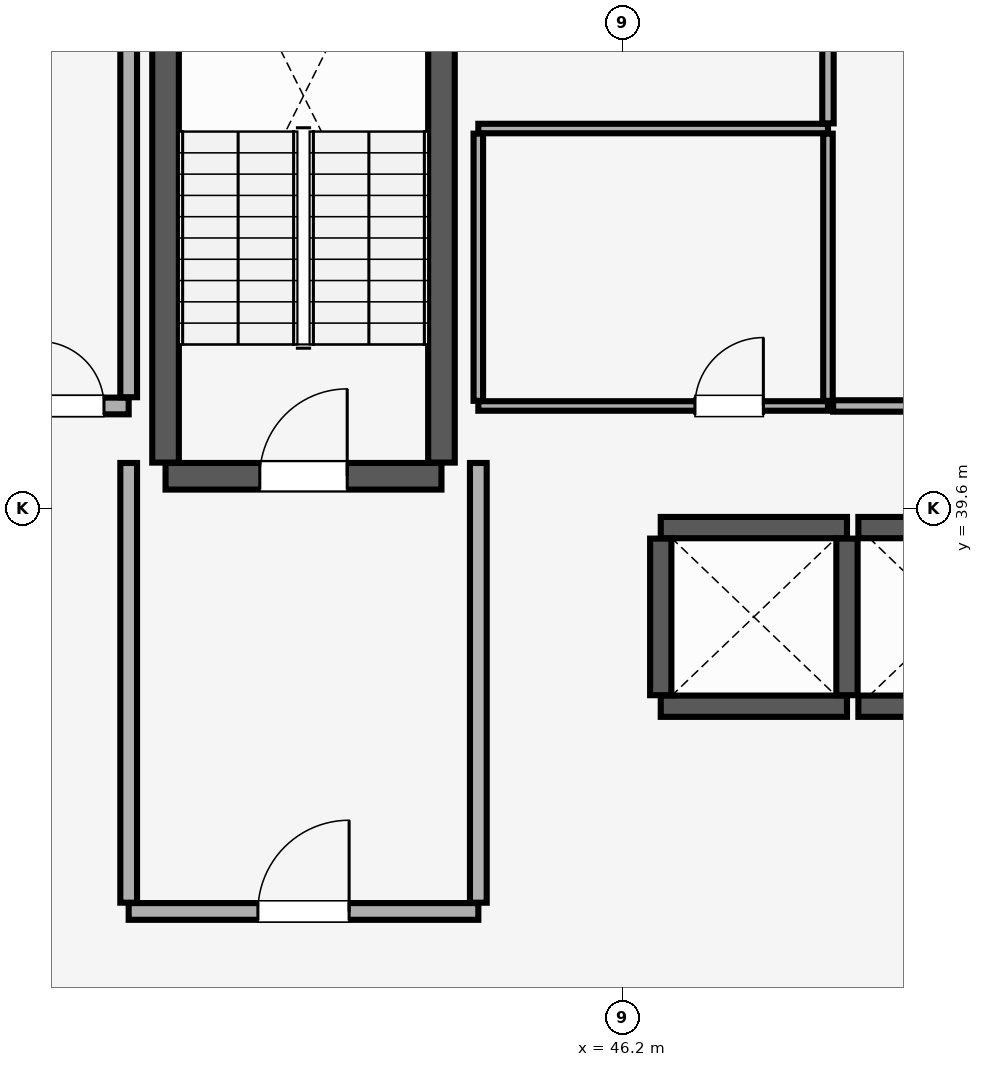
"""IFC4 building model, lengths in metres.
Left out: names, types, materials, properties, quantities, classifications, styles, units other than length and angle.
Written with IfcOpenShell. Run it as: python <this file> out.ifc"""

import sys

from ifc_helpers import new_model, si_unit, direction, frame, frame_2d, origin, place, context, subcontext, project, spatial, rectangle, extrude, element, fill, save


model = new_model("IFC4")
c1 = context("Model", 3, precision=1e-05, world=origin(), true_north=direction((0.0, 1.0)))
c2 = subcontext(c1, "Body", "Model", "MODEL_VIEW")
j1 = project(units=[si_unit("LENGTHUNIT", "METRE"), si_unit("PLANEANGLEUNIT", "RADIAN")], contexts=[c1])
p1 = place(None, origin())
s1 = spatial("IfcSite", under=j1, at=p1, CompositionType="ELEMENT")
p2 = place(p1, origin())
s2 = spatial("IfcBuilding", under=s1, at=p2, CompositionType="ELEMENT")
p3 = place(p2, frame((0.0, 0.0, 46.4)))
s3 = spatial("IfcBuildingStorey", under=s2, at=p3, CompositionType="ELEMENT", Elevation=46.4)
p4 = place(p3, frame((40.185, 40.025, 0.0), z_axis=(0.0, 0.0, 1.0), x_axis=(1.0, 0.0, 0.0)))
e1 = element("IfcWall", 1, at=p4, inside=s3, PredefinedType="SHEAR", context=c2, shape_type="SweptSolid", body=[
    extrude(rectangle(XDim=3.63, YDim=0.35, at=frame_2d((1.815, 0.0))), origin(), (0.0, 0.0, 1.0), 3.51),
])
p5 = place(p4, frame((1.24, 0.0, 0.0)))
e2 = element("IfcOpeningElement", 2, at=p5, cuts=e1, PredefinedType="OPENING", context=c2, shape_type="SweptSolid", body=[
    extrude(rectangle(XDim=1.15, YDim=2.15, at=frame_2d((0.575, 1.075))), frame((0.0, 0.185, 0.0), z_axis=(0.0, -1.0, 0.0), x_axis=(1.0, 0.0, 0.0)), (0.0, 0.0, 1.0), 0.37),
])
for number, where, z_axis, x_axis in (
    (3, (40.185, 40.205, 0.0), (0.0, 0.0, 1.0), (0.0, 1.0, 0.0)),
    (4, (43.815, 40.205, 0.0), (0.0, 0.0, 1.0), (0.0, 1.0, 0.0)),
):
    element("IfcWall", number, at=place(p3, frame(where, z_axis=z_axis, x_axis=x_axis)), inside=s3, PredefinedType="SHEAR", context=c2, shape_type="SweptSolid", body=[
        extrude(rectangle(XDim=8.09, YDim=0.35, at=frame_2d((4.045, 0.0))), origin(), (0.0, 0.0, 1.0), 3.51),
    ])
for number, where, z_axis, x_axis in (
    (5, (46.7, 37.0, 0.0), (0.0, 0.0, 1.0), (1.0, 0.0, 0.0)),
    (6, (46.7, 39.35, 0.0), (0.0, 0.0, 1.0), (1.0, 0.0, 0.0)),
):
    element("IfcWall", number, at=place(p3, frame(where, z_axis=z_axis, x_axis=x_axis)), inside=s3, PredefinedType="SHEAR", context=c2, shape_type="SweptSolid", body=[
        extrude(rectangle(XDim=2.45, YDim=0.28, at=frame_2d((1.225, 0.0))), origin(), (0.0, 0.0, 1.0), 3.51),
    ])
for number, where, z_axis, x_axis in (
    (7, (46.7, 37.145, 0.0), (0.0, 0.0, 1.0), (0.0, 1.0, 0.0)),
    (8, (49.15, 37.145, 0.0), (0.0, 0.0, 1.0), (0.0, 1.0, 0.0)),
):
    element("IfcWall", number, at=place(p3, frame(where, z_axis=z_axis, x_axis=x_axis)), inside=s3, PredefinedType="SHEAR", context=c2, shape_type="SweptSolid", body=[
        extrude(rectangle(XDim=2.06, YDim=0.28, at=frame_2d((1.03, 0.0))), origin(), (0.0, 0.0, 1.0), 3.51),
    ])
for number, where, z_axis, x_axis in (
    (9, (49.3, 37.0, 0.0), (0.0, 0.0, 1.0), (1.0, 0.0, 0.0)),
    (10, (49.3, 39.35, 0.0), (0.0, 0.0, 1.0), (1.0, 0.0, 0.0)),
):
    element("IfcWall", number, at=place(p3, frame(where, z_axis=z_axis, x_axis=x_axis)), inside=s3, PredefinedType="SHEAR", context=c2, shape_type="SweptSolid", body=[
        extrude(rectangle(XDim=2.45, YDim=0.28, at=frame_2d((1.225, 0.0))), origin(), (0.0, 0.0, 1.0), 3.51),
    ])
p6 = place(p3, frame((39.7, 34.3, 0.0), z_axis=(0.0, 0.0, 1.0), x_axis=(1.0, 0.0, 0.0)))
e11 = element("IfcWall", 11, at=p6, inside=s3, PredefinedType="PARTITIONING", context=c2, shape_type="SweptSolid", body=[
    extrude(rectangle(XDim=4.6, YDim=0.22, at=frame_2d((2.3, 0.0))), origin(), (0.0, 0.0, 1.0), 3.51),
])
p7 = place(p6, frame((1.7, 0.0, 0.0)))
e12 = element("IfcOpeningElement", 12, at=p7, cuts=e11, PredefinedType="OPENING", context=c2, shape_type="SweptSolid", body=[
    extrude(rectangle(XDim=1.2, YDim=2.15, at=frame_2d((0.6, 1.075))), frame((0.0, 0.12, 0.0), z_axis=(0.0, -1.0, 0.0), x_axis=(1.0, 0.0, 0.0)), (0.0, 0.0, 1.0), 0.24),
])
for number, where, z_axis, x_axis in (
    (13, (39.7, 34.415, 0.0), (0.0, 0.0, 1.0), (0.0, 1.0, 0.0)),
    (14, (44.3, 34.415, 0.0), (0.0, 0.0, 1.0), (0.0, 1.0, 0.0)),
):
    element("IfcWall", number, at=place(p3, frame(where, z_axis=z_axis, x_axis=x_axis)), inside=s3, PredefinedType="PARTITIONING", context=c2, shape_type="SweptSolid", body=[
        extrude(rectangle(XDim=5.785, YDim=0.22, at=frame_2d((2.893, 0.0))), origin(), (0.0, 0.0, 1.0), 3.51),
    ])
p8 = place(p3, frame((36.28, 40.95, 0.0), z_axis=(0.0, 0.0, 1.0), x_axis=(1.0, 0.0, 0.0)))
e15 = element("IfcWall", 15, at=p8, inside=s3, PredefinedType="PARTITIONING", context=c2, shape_type="SweptSolid", body=[
    extrude(rectangle(XDim=3.42, YDim=0.22, at=frame_2d((1.71, 0.0))), origin(), (0.0, 0.0, 1.0), 3.51),
])
p9 = place(p8, frame((2.245, 0.0, 0.0)))
e16 = element("IfcOpeningElement", 16, at=p9, cuts=e15, PredefinedType="OPENING", context=c2, shape_type="SweptSolid", body=[
    extrude(rectangle(XDim=0.85, YDim=2.1, at=frame_2d((0.425, 1.05))), frame((0.0, 0.12, 0.0), z_axis=(0.0, -1.0, 0.0), x_axis=(1.0, 0.0, 0.0)), (0.0, 0.0, 1.0), 0.24),
])
p10 = place(p3, frame((39.7, 41.065, 0.0), z_axis=(0.0, 0.0, 1.0), x_axis=(0.0, 1.0, 0.0)))
e17 = element("IfcWall", 17, at=p10, inside=s3, PredefinedType="PARTITIONING", context=c2, shape_type="SweptSolid", body=[
    extrude(rectangle(XDim=7.785, YDim=0.22, at=frame_2d((3.893, 0.0))), origin(), (0.0, 0.0, 1.0), 3.51),
])
p11 = place(p3, frame((44.3, 40.95, 0.0), z_axis=(0.0, 0.0, 1.0), x_axis=(1.0, 0.0, 0.0)))
e18 = element("IfcWall", 18, at=p11, inside=s3, PredefinedType="PARTITIONING", context=c2, shape_type="SweptSolid", body=[
    extrude(rectangle(XDim=4.6, YDim=0.125, at=frame_2d((2.3, 0.0))), origin(), (0.0, 0.0, 1.0), 3.51),
])
p12 = place(p11, frame((2.85, 0.0, 0.0)))
e19 = element("IfcOpeningElement", 19, at=p12, cuts=e18, PredefinedType="OPENING", context=c2, shape_type="SweptSolid", body=[
    extrude(rectangle(XDim=0.9, YDim=2.1, at=frame_2d((0.45, 1.05))), frame((0.0, 0.073, 0.0), z_axis=(0.0, -1.0, 0.0), x_axis=(1.0, 0.0, 0.0)), (0.0, 0.0, 1.0), 0.145),
])
p13 = place(p3, frame((44.3, 44.6, 0.0), z_axis=(0.0, 0.0, 1.0), x_axis=(1.0, 0.0, 0.0)))
e20 = element("IfcWall", 20, at=p13, inside=s3, PredefinedType="PARTITIONING", context=c2, shape_type="SweptSolid", body=[
    extrude(rectangle(XDim=4.6, YDim=0.125, at=frame_2d((2.3, 0.0))), origin(), (0.0, 0.0, 1.0), 3.51),
])
for number, where, z_axis, x_axis in (
    (21, (44.3, 41.018, 0.0), (0.0, 0.0, 1.0), (0.0, 1.0, 0.0)),
    (22, (48.9, 41.018, 0.0), (0.0, 0.0, 1.0), (0.0, 1.0, 0.0)),
):
    element("IfcWall", number, at=place(p3, frame(where, z_axis=z_axis, x_axis=x_axis)), inside=s3, PredefinedType="PARTITIONING", context=c2, shape_type="SweptSolid", body=[
        extrude(rectangle(XDim=3.515, YDim=0.125, at=frame_2d((1.757, 0.0))), origin(), (0.0, 0.0, 1.0), 3.51),
    ])
p14 = place(p3, frame((48.968, 40.95, 0.0), z_axis=(0.0, 0.0, 1.0), x_axis=(1.0, 0.0, 0.0)))
e23 = element("IfcWall", 23, at=p14, inside=s3, PredefinedType="PARTITIONING", context=c2, shape_type="SweptSolid", body=[
    extrude(rectangle(XDim=4.232, YDim=0.15, at=frame_2d((2.116, 0.0))), origin(), (0.0, 0.0, 1.0), 3.51),
])
p15 = place(p14, frame((1.657, 0.0, 0.0)))
e24 = element("IfcOpeningElement", 24, at=p15, cuts=e23, PredefinedType="OPENING", context=c2, shape_type="SweptSolid", body=[
    extrude(rectangle(XDim=0.85, YDim=2.1, at=frame_2d((0.425, 1.05))), frame((0.0, 0.085, 0.0), z_axis=(0.0, -1.0, 0.0), x_axis=(1.0, 0.0, 0.0)), (0.0, 0.0, 1.0), 0.17),
])
p16 = place(p3, frame((48.9, 44.667, 0.0), z_axis=(0.0, 0.0, 1.0), x_axis=(0.0, 1.0, 0.0)))
e25 = element("IfcWall", 25, at=p16, inside=s3, PredefinedType="PARTITIONING", context=c2, shape_type="SweptSolid", body=[
    extrude(rectangle(XDim=4.183, YDim=0.15, at=frame_2d((2.091, 0.0))), origin(), (0.0, 0.0, 1.0), 3.51),
])
p17 = place(p5, origin())
e26 = element("IfcDoor", 26, at=p17, inside=s3, OperationType="SINGLE_SWING_RIGHT", PredefinedType="DOOR", context=c2, shape_type="SweptSolid", body=[
    extrude(rectangle(XDim=1.15, YDim=2.15, at=frame_2d((0.575, 1.075))), frame((0.0, 0.025, 0.0), z_axis=(0.0, -1.0, 0.0), x_axis=(1.0, 0.0, 0.0)), (0.0, 0.0, 1.0), 0.05),
])
fill(e2, e26)
p18 = place(p7, origin())
e27 = element("IfcDoor", 27, at=p18, inside=s3, OperationType="SINGLE_SWING_RIGHT", PredefinedType="DOOR", context=c2, shape_type="SweptSolid", body=[
    extrude(rectangle(XDim=1.2, YDim=2.15, at=frame_2d((0.6, 1.075))), frame((0.0, 0.025, 0.0), z_axis=(0.0, -1.0, 0.0), x_axis=(1.0, 0.0, 0.0)), (0.0, 0.0, 1.0), 0.05),
])
fill(e12, e27)
p19 = place(p9, origin())
e28 = element("IfcDoor", 28, at=p19, inside=s3, OperationType="SINGLE_SWING_LEFT", PredefinedType="DOOR", context=c2, shape_type="SweptSolid", body=[
    extrude(rectangle(XDim=0.85, YDim=2.1, at=frame_2d((0.425, 1.05))), frame((0.0, 0.025, 0.0), z_axis=(0.0, -1.0, 0.0), x_axis=(1.0, 0.0, 0.0)), (0.0, 0.0, 1.0), 0.05),
])
fill(e16, e28)
p20 = place(p12, origin())
e29 = element("IfcDoor", 29, at=p20, inside=s3, OperationType="SINGLE_SWING_RIGHT", PredefinedType="DOOR", context=c2, shape_type="SweptSolid", body=[
    extrude(rectangle(XDim=0.9, YDim=2.1, at=frame_2d((0.45, 1.05))), frame((0.0, 0.025, 0.0), z_axis=(0.0, -1.0, 0.0), x_axis=(1.0, 0.0, 0.0)), (0.0, 0.0, 1.0), 0.05),
])
fill(e19, e29)
save(model, sys.argv[1])
